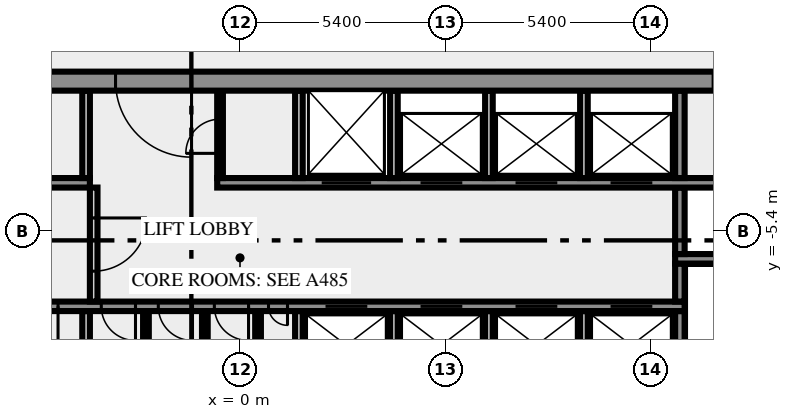
"""IFC4 building model, lengths in metres.
Left out: names, types, materials, properties, quantities, classifications, styles, units other than length and angle.
Written with IfcOpenShell. Run it as: python <this file> out.ifc"""

import sys

from ifc_helpers import new_model, si_unit, direction, frame, frame_2d, origin, place, context, subcontext, project, spatial, rectangle, extrude, element, fill, save


model = new_model("IFC4")
c1 = context("Model", 3, precision=1e-05, world=origin(), true_north=direction((0.0, 1.0)))
c2 = subcontext(c1, "Body", "Model", "MODEL_VIEW")
j1 = project(units=[si_unit("LENGTHUNIT", "METRE"), si_unit("PLANEANGLEUNIT", "RADIAN")], contexts=[c1])
p1 = place(None, origin())
s1 = spatial("IfcSite", under=j1, at=p1, CompositionType="ELEMENT")
p2 = place(p1, origin())
s2 = spatial("IfcBuilding", under=s1, at=p2, CompositionType="ELEMENT")
p3 = place(p2, frame((0.0, 0.0, 172.0)))
s3 = spatial("IfcBuildingStorey", under=s2, at=p3, CompositionType="ELEMENT", Elevation=172.0)
p4 = place(p3, frame((-4.05, -10.5, 0.0), z_axis=(0.0, 0.0, 1.0), x_axis=(0.0, 1.0, 0.0)))
e1 = element("IfcWall", 1, at=p4, inside=s3, PredefinedType="SOLIDWALL", context=c2, shape_type="SweptSolid", body=[
    extrude(rectangle(XDim=3.0, YDim=0.2, at=frame_2d((1.5, 0.0))), origin(), (0.0, 0.0, 1.0), 3.65),
])
for number, where, z_axis, x_axis in (
    (2, (-2.475, -10.5, 0.0), (0.0, 0.0, 1.0), (0.0, 1.0, 0.0)),
    (3, (-0.925, -10.5, 0.0), (0.0, 0.0, 1.0), (0.0, 1.0, 0.0)),
    (4, (0.475, -10.5, 0.0), (0.0, 0.0, 1.0), (0.0, 1.0, 0.0)),
):
    element("IfcWall", number, at=place(p3, frame(where, z_axis=z_axis, x_axis=x_axis)), inside=s3, PredefinedType="PARTITIONING", context=c2, shape_type="SweptSolid", body=[
        extrude(rectangle(XDim=3.0, YDim=0.15, at=frame_2d((1.5, 0.0))), origin(), (0.0, 0.0, 1.0), 3.65),
    ])
for number, where, z_axis, x_axis in (
    (5, (1.55, -10.5, 0.0), (0.0, 0.0, 1.0), (0.0, 1.0, 0.0)),
    (6, (4.05, -10.5, 0.0), (0.0, 0.0, 1.0), (0.0, 1.0, 0.0)),
    (7, (6.55, -10.5, 0.0), (0.0, 0.0, 1.0), (0.0, 1.0, 0.0)),
    (8, (9.05, -10.5, 0.0), (0.0, 0.0, 1.0), (0.0, 1.0, 0.0)),
):
    element("IfcWall", number, at=place(p3, frame(where, z_axis=z_axis, x_axis=x_axis)), inside=s3, PredefinedType="SOLIDWALL", context=c2, shape_type="SweptSolid", body=[
        extrude(rectangle(XDim=3.0, YDim=0.2, at=frame_2d((1.5, 0.0))), origin(), (0.0, 0.0, 1.0), 3.65),
    ])
p5 = place(p3, frame((11.575, -10.5, 0.0), z_axis=(0.0, 0.0, 1.0), x_axis=(0.0, 1.0, 0.0)))
e9 = element("IfcWall", 9, at=p5, inside=s3, PredefinedType="SHEAR", context=c2, shape_type="SweptSolid", body=[
    extrude(rectangle(XDim=3.0, YDim=0.25, at=frame_2d((1.5, 0.0))), origin(), (0.0, 0.0, 1.0), 3.65),
])
p6 = place(p3, frame((11.7, -7.375, 0.0), z_axis=(0.0, 0.0, 1.0), x_axis=(-1.0, 0.0, 0.0)))
e10 = element("IfcWall", 10, at=p6, inside=s3, PredefinedType="SHEAR", context=c2, shape_type="SweptSolid", body=[
    extrude(rectangle(XDim=23.4, YDim=0.25, at=frame_2d((11.7, 0.0))), origin(), (0.0, 0.0, 1.0), 3.65),
])
p7 = place(p6, frame((20.213, 0.0, 0.0)))
e11 = element("IfcOpeningElement", 11, at=p7, cuts=e10, PredefinedType="OPENING", context=c2, shape_type="SweptSolid", body=[
    extrude(rectangle(XDim=0.9, YDim=2.1, at=frame_2d((0.45, 1.05))), frame((0.0, 0.135, 0.0), z_axis=(0.0, -1.0, 0.0), x_axis=(1.0, 0.0, 0.0)), (0.0, 0.0, 1.0), 0.27),
])
p8 = place(p6, frame((16.488, 0.0, 0.0)))
e12 = element("IfcOpeningElement", 12, at=p8, cuts=e10, PredefinedType="OPENING", context=c2, shape_type="SweptSolid", body=[
    extrude(rectangle(XDim=0.9, YDim=2.1, at=frame_2d((0.45, 1.05))), frame((0.0, 0.135, 0.0), z_axis=(0.0, -1.0, 0.0), x_axis=(1.0, 0.0, 0.0)), (0.0, 0.0, 1.0), 0.27),
])
p9 = place(p6, frame((14.45, 0.0, 0.0)))
e13 = element("IfcOpeningElement", 13, at=p9, cuts=e10, PredefinedType="OPENING", context=c2, shape_type="SweptSolid", body=[
    extrude(rectangle(XDim=0.9, YDim=2.1, at=frame_2d((0.45, 1.05))), frame((0.0, 0.135, 0.0), z_axis=(0.0, -1.0, 0.0), x_axis=(1.0, 0.0, 0.0)), (0.0, 0.0, 1.0), 0.27),
])
p10 = place(p6, frame((12.95, 0.0, 0.0)))
e14 = element("IfcOpeningElement", 14, at=p10, cuts=e10, PredefinedType="OPENING", context=c2, shape_type="SweptSolid", body=[
    extrude(rectangle(XDim=0.9, YDim=2.1, at=frame_2d((0.45, 1.05))), frame((0.0, 0.135, 0.0), z_axis=(0.0, -1.0, 0.0), x_axis=(1.0, 0.0, 0.0)), (0.0, 0.0, 1.0), 0.27),
])
p11 = place(p6, frame((11.475, 0.0, 0.0)))
e15 = element("IfcOpeningElement", 15, at=p11, cuts=e10, PredefinedType="OPENING", context=c2, shape_type="SweptSolid", body=[
    extrude(rectangle(XDim=0.9, YDim=2.1, at=frame_2d((0.45, 1.05))), frame((0.0, 0.135, 0.0), z_axis=(0.0, -1.0, 0.0), x_axis=(1.0, 0.0, 0.0)), (0.0, 0.0, 1.0), 0.27),
])
p12 = place(p6, frame((10.45, 0.0, 0.0)))
e16 = element("IfcOpeningElement", 16, at=p12, cuts=e10, PredefinedType="OPENING", context=c2, shape_type="SweptSolid", body=[
    extrude(rectangle(XDim=0.5, YDim=2.1, at=frame_2d((0.25, 1.05))), frame((0.0, 0.135, 0.0), z_axis=(0.0, -1.0, 0.0), x_axis=(1.0, 0.0, 0.0)), (0.0, 0.0, 1.0), 0.27),
])
p13 = place(p6, frame((8.35, 0.0, 0.0)))
e17 = element("IfcOpeningElement", 17, at=p13, cuts=e10, PredefinedType="OPENING", context=c2, shape_type="SweptSolid", body=[
    extrude(rectangle(XDim=1.1, YDim=2.1, at=frame_2d((0.55, 1.05))), frame((0.0, 0.135, 0.0), z_axis=(0.0, -1.0, 0.0), x_axis=(1.0, 0.0, 0.0)), (0.0, 0.0, 1.0), 0.27),
])
p14 = place(p6, frame((5.85, 0.0, 0.0)))
e18 = element("IfcOpeningElement", 18, at=p14, cuts=e10, PredefinedType="OPENING", context=c2, shape_type="SweptSolid", body=[
    extrude(rectangle(XDim=1.1, YDim=2.1, at=frame_2d((0.55, 1.05))), frame((0.0, 0.135, 0.0), z_axis=(0.0, -1.0, 0.0), x_axis=(1.0, 0.0, 0.0)), (0.0, 0.0, 1.0), 0.27),
])
p15 = place(p6, frame((3.35, 0.0, 0.0)))
e19 = element("IfcOpeningElement", 19, at=p15, cuts=e10, PredefinedType="OPENING", context=c2, shape_type="SweptSolid", body=[
    extrude(rectangle(XDim=1.1, YDim=2.1, at=frame_2d((0.55, 1.05))), frame((0.0, 0.135, 0.0), z_axis=(0.0, -1.0, 0.0), x_axis=(1.0, 0.0, 0.0)), (0.0, 0.0, 1.0), 0.27),
])
p16 = place(p6, frame((0.85, 0.0, 0.0)))
e20 = element("IfcOpeningElement", 20, at=p16, cuts=e10, PredefinedType="OPENING", context=c2, shape_type="SweptSolid", body=[
    extrude(rectangle(XDim=1.1, YDim=2.1, at=frame_2d((0.55, 1.05))), frame((0.0, 0.135, 0.0), z_axis=(0.0, -1.0, 0.0), x_axis=(1.0, 0.0, 0.0)), (0.0, 0.0, 1.0), 0.27),
])
p17 = place(p3, frame((-3.85, -4.25, 0.0), z_axis=(0.0, 0.0, 1.0), x_axis=(0.0, -1.0, 0.0)))
e21 = element("IfcWall", 21, at=p17, inside=s3, PredefinedType="SOLIDWALL", context=c2, shape_type="SweptSolid", body=[
    extrude(rectangle(XDim=3.0, YDim=0.2, at=frame_2d((1.5, 0.0))), origin(), (0.0, 0.0, 1.0), 3.65),
])
p18 = place(p17, frame((0.8, 0.0, 0.0)))
e22 = element("IfcOpeningElement", 22, at=p18, cuts=e21, PredefinedType="OPENING", context=c2, shape_type="SweptSolid", body=[
    extrude(rectangle(XDim=1.4, YDim=2.1, at=frame_2d((0.7, 1.05))), frame((0.0, 0.11, 0.0), z_axis=(0.0, -1.0, 0.0), x_axis=(1.0, 0.0, 0.0)), (0.0, 0.0, 1.0), 0.22),
])
p19 = place(p3, frame((11.575, -7.25, 0.0), z_axis=(0.0, 0.0, 1.0), x_axis=(0.0, 1.0, 0.0)))
e23 = element("IfcWall", 23, at=p19, inside=s3, PredefinedType="SHEAR", context=c2, shape_type="SweptSolid", body=[
    extrude(rectangle(XDim=1.0, YDim=0.25, at=frame_2d((0.5, 0.0))), origin(), (0.0, 0.0, 1.0), 3.65),
])
p20 = place(p3, frame((19.5, -6.125, 0.0), z_axis=(0.0, 0.0, 1.0), x_axis=(-1.0, 0.0, 0.0)))
e24 = element("IfcWall", 24, at=p20, inside=s3, PredefinedType="SHEAR", context=c2, shape_type="SweptSolid", body=[
    extrude(rectangle(XDim=8.05, YDim=0.25, at=frame_2d((4.025, 0.0))), origin(), (0.0, 0.0, 1.0), 3.65),
])
p21 = place(p20, frame((0.05, 0.0, 0.0)))
e25 = element("IfcOpeningElement", 25, at=p21, cuts=e24, PredefinedType="OPENING", context=c2, shape_type="SweptSolid", body=[
    extrude(rectangle(XDim=1.8, YDim=2.1, at=frame_2d((0.9, 1.05))), frame((0.0, 0.135, 0.0), z_axis=(0.0, -1.0, 0.0), x_axis=(1.0, 0.0, 0.0)), (0.0, 0.0, 1.0), 0.27),
])
p22 = place(p3, frame((11.575, -6.0, 0.0), z_axis=(0.0, 0.0, 1.0), x_axis=(0.0, 1.0, 0.0)))
e26 = element("IfcWall", 26, at=p22, inside=s3, PredefinedType="SHEAR", context=c2, shape_type="SweptSolid", body=[
    extrude(rectangle(XDim=1.75, YDim=0.25, at=frame_2d((0.875, 0.0))), origin(), (0.0, 0.0, 1.0), 3.65),
])
p23 = place(p3, frame((-14.35, -4.125, 0.0), z_axis=(0.0, 0.0, 1.0), x_axis=(1.0, 0.0, 0.0)))
e27 = element("IfcWall", 27, at=p23, inside=s3, PredefinedType="SHEAR", context=c2, shape_type="SweptSolid", body=[
    extrude(rectangle(XDim=10.4, YDim=0.25, at=frame_2d((5.2, 0.0))), origin(), (0.0, 0.0, 1.0), 3.65),
])
p24 = place(p3, frame((-0.6, -4.125, 0.0), z_axis=(0.0, 0.0, 1.0), x_axis=(1.0, 0.0, 0.0)))
e28 = element("IfcWall", 28, at=p24, inside=s3, PredefinedType="SHEAR", context=c2, shape_type="SweptSolid", body=[
    extrude(rectangle(XDim=14.95, YDim=0.25, at=frame_2d((7.475, 0.0))), origin(), (0.0, 0.0, 1.0), 3.65),
])
p25 = place(p24, frame((2.75, 0.0, 0.0)))
e29 = element("IfcOpeningElement", 29, at=p25, cuts=e28, PredefinedType="OPENING", context=c2, shape_type="SweptSolid", body=[
    extrude(rectangle(XDim=1.3, YDim=2.1, at=frame_2d((0.65, 1.05))), frame((0.0, 0.135, 0.0), z_axis=(0.0, -1.0, 0.0), x_axis=(1.0, 0.0, 0.0)), (0.0, 0.0, 1.0), 0.27),
])
p26 = place(p24, frame((5.35, 0.0, 0.0)))
e30 = element("IfcOpeningElement", 30, at=p26, cuts=e28, PredefinedType="OPENING", context=c2, shape_type="SweptSolid", body=[
    extrude(rectangle(XDim=1.1, YDim=2.1, at=frame_2d((0.55, 1.05))), frame((0.0, 0.135, 0.0), z_axis=(0.0, -1.0, 0.0), x_axis=(1.0, 0.0, 0.0)), (0.0, 0.0, 1.0), 0.27),
])
p27 = place(p24, frame((7.85, 0.0, 0.0)))
e31 = element("IfcOpeningElement", 31, at=p27, cuts=e28, PredefinedType="OPENING", context=c2, shape_type="SweptSolid", body=[
    extrude(rectangle(XDim=1.1, YDim=2.1, at=frame_2d((0.55, 1.05))), frame((0.0, 0.135, 0.0), z_axis=(0.0, -1.0, 0.0), x_axis=(1.0, 0.0, 0.0)), (0.0, 0.0, 1.0), 0.27),
])
p28 = place(p24, frame((10.35, 0.0, 0.0)))
e32 = element("IfcOpeningElement", 32, at=p28, cuts=e28, PredefinedType="OPENING", context=c2, shape_type="SweptSolid", body=[
    extrude(rectangle(XDim=1.1, YDim=2.1, at=frame_2d((0.55, 1.05))), frame((0.0, 0.135, 0.0), z_axis=(0.0, -1.0, 0.0), x_axis=(1.0, 0.0, 0.0)), (0.0, 0.0, 1.0), 0.27),
])
p29 = place(p3, frame((-4.05, -4.0, 0.0), z_axis=(0.0, 0.0, 1.0), x_axis=(0.0, 1.0, 0.0)))
e33 = element("IfcWall", 33, at=p29, inside=s3, PredefinedType="SOLIDWALL", context=c2, shape_type="SweptSolid", body=[
    extrude(rectangle(XDim=2.3, YDim=0.2, at=frame_2d((1.15, 0.0))), origin(), (0.0, 0.0, 1.0), 3.65),
])
p30 = place(p3, frame((-0.525, -4.0, 0.0), z_axis=(0.0, 0.0, 1.0), x_axis=(0.0, 1.0, 0.0)))
e34 = element("IfcWall", 34, at=p30, inside=s3, PredefinedType="PARTITIONING", context=c2, shape_type="SweptSolid", body=[
    extrude(rectangle(XDim=2.3, YDim=0.15, at=frame_2d((1.15, 0.0))), origin(), (0.0, 0.0, 1.0), 3.65),
])
p31 = place(p30, frame((0.65, 0.0, 0.0)))
e35 = element("IfcOpeningElement", 35, at=p31, cuts=e34, PredefinedType="OPENING", context=c2, shape_type="SweptSolid", body=[
    extrude(rectangle(XDim=0.9, YDim=2.1, at=frame_2d((0.45, 1.05))), frame((0.0, 0.085, 0.0), z_axis=(0.0, -1.0, 0.0), x_axis=(1.0, 0.0, 0.0)), (0.0, 0.0, 1.0), 0.17),
])
for number, where, z_axis, x_axis in (
    (36, (1.55, -4.0, 0.0), (0.0, 0.0, 1.0), (0.0, 1.0, 0.0)),
    (37, (4.05, -4.0, 0.0), (0.0, 0.0, 1.0), (0.0, 1.0, 0.0)),
    (38, (6.55, -4.0, 0.0), (0.0, 0.0, 1.0), (0.0, 1.0, 0.0)),
    (39, (9.05, -4.0, 0.0), (0.0, 0.0, 1.0), (0.0, 1.0, 0.0)),
):
    element("IfcWall", number, at=place(p3, frame(where, z_axis=z_axis, x_axis=x_axis)), inside=s3, PredefinedType="SOLIDWALL", context=c2, shape_type="SweptSolid", body=[
        extrude(rectangle(XDim=2.3, YDim=0.2, at=frame_2d((1.15, 0.0))), origin(), (0.0, 0.0, 1.0), 3.65),
    ])
p32 = place(p3, frame((11.575, -4.0, 0.0), z_axis=(0.0, 0.0, 1.0), x_axis=(0.0, 1.0, 0.0)))
e40 = element("IfcWall", 40, at=p32, inside=s3, PredefinedType="SHEAR", context=c2, shape_type="SweptSolid", body=[
    extrude(rectangle(XDim=2.3, YDim=0.25, at=frame_2d((1.15, 0.0))), origin(), (0.0, 0.0, 1.0), 3.65),
])
p33 = place(p3, frame((20.49, -1.45, 0.0), z_axis=(0.0, 0.0, 1.0), x_axis=(-1.0, 0.0, 0.0)))
e41 = element("IfcWall", 41, at=p33, inside=s3, PredefinedType="SHEAR", context=c2, shape_type="SweptSolid", body=[
    extrude(rectangle(XDim=40.98, YDim=0.5, at=frame_2d((20.49, 0.0))), origin(), (0.0, 0.0, 1.0), 3.65),
])
p34 = place(p33, frame((38.14, 0.0, 0.0)))
e42 = element("IfcOpeningElement", 42, at=p34, cuts=e41, PredefinedType="OPENING", context=c2, shape_type="SweptSolid", body=[
    extrude(rectangle(XDim=1.8, YDim=2.1, at=frame_2d((0.9, 1.05))), frame((0.0, 0.26, 0.0), z_axis=(0.0, -1.0, 0.0), x_axis=(1.0, 0.0, 0.0)), (0.0, 0.0, 1.0), 0.52),
])
p35 = place(p33, frame((36.728, 0.0, 0.0)))
e43 = element("IfcOpeningElement", 43, at=p35, cuts=e41, PredefinedType="OPENING", context=c2, shape_type="SweptSolid", body=[
    extrude(rectangle(XDim=0.8, YDim=2.1, at=frame_2d((0.4, 1.05))), frame((0.0, 0.26, 0.0), z_axis=(0.0, -1.0, 0.0), x_axis=(1.0, 0.0, 0.0)), (0.0, 0.0, 1.0), 0.52),
])
p36 = place(p33, frame((35.153, 0.0, 0.0)))
e44 = element("IfcOpeningElement", 44, at=p36, cuts=e41, PredefinedType="OPENING", context=c2, shape_type="SweptSolid", body=[
    extrude(rectangle(XDim=0.8, YDim=2.1, at=frame_2d((0.4, 1.05))), frame((0.0, 0.26, 0.0), z_axis=(0.0, -1.0, 0.0), x_axis=(1.0, 0.0, 0.0)), (0.0, 0.0, 1.0), 0.52),
])
p37 = place(p33, frame((32.94, 0.0, 0.0)))
e45 = element("IfcOpeningElement", 45, at=p37, cuts=e41, PredefinedType="OPENING", context=c2, shape_type="SweptSolid", body=[
    extrude(rectangle(XDim=0.9, YDim=2.1, at=frame_2d((0.45, 1.05))), frame((0.0, 0.26, 0.0), z_axis=(0.0, -1.0, 0.0), x_axis=(1.0, 0.0, 0.0)), (0.0, 0.0, 1.0), 0.52),
])
p38 = place(p33, frame((27.84, 0.0, 0.0)))
e46 = element("IfcOpeningElement", 46, at=p38, cuts=e41, PredefinedType="OPENING", context=c2, shape_type="SweptSolid", body=[
    extrude(rectangle(XDim=0.9, YDim=2.1, at=frame_2d((0.45, 1.05))), frame((0.0, 0.26, 0.0), z_axis=(0.0, -1.0, 0.0), x_axis=(1.0, 0.0, 0.0)), (0.0, 0.0, 1.0), 0.52),
])
p39 = place(p33, frame((21.765, 0.0, 0.0)))
e47 = element("IfcOpeningElement", 47, at=p39, cuts=e41, PredefinedType="OPENING", context=c2, shape_type="SweptSolid", body=[
    extrude(rectangle(XDim=2.0, YDim=2.1, at=frame_2d((1.0, 1.05))), frame((0.0, 0.26, 0.0), z_axis=(0.0, -1.0, 0.0), x_axis=(1.0, 0.0, 0.0)), (0.0, 0.0, 1.0), 0.52),
])
p40 = place(p33, frame((7.14, 0.0, 0.0)))
e48 = element("IfcOpeningElement", 48, at=p40, cuts=e41, PredefinedType="OPENING", context=c2, shape_type="SweptSolid", body=[
    extrude(rectangle(XDim=0.9, YDim=2.1, at=frame_2d((0.45, 1.05))), frame((0.0, 0.26, 0.0), z_axis=(0.0, -1.0, 0.0), x_axis=(1.0, 0.0, 0.0)), (0.0, 0.0, 1.0), 0.52),
])
p41 = place(p33, frame((4.19, 0.0, 0.0)))
e49 = element("IfcOpeningElement", 49, at=p41, cuts=e41, PredefinedType="OPENING", context=c2, shape_type="SweptSolid", body=[
    extrude(rectangle(XDim=0.9, YDim=2.1, at=frame_2d((0.45, 1.05))), frame((0.0, 0.26, 0.0), z_axis=(0.0, -1.0, 0.0), x_axis=(1.0, 0.0, 0.0)), (0.0, 0.0, 1.0), 0.52),
])
p42 = place(p33, frame((1.04, 0.0, 0.0)))
e50 = element("IfcOpeningElement", 50, at=p42, cuts=e41, PredefinedType="OPENING", context=c2, shape_type="SweptSolid", body=[
    extrude(rectangle(XDim=1.8, YDim=2.1, at=frame_2d((0.9, 1.05))), frame((0.0, 0.26, 0.0), z_axis=(0.0, -1.0, 0.0), x_axis=(1.0, 0.0, 0.0)), (0.0, 0.0, 1.0), 0.52),
])
p43 = place(p8, origin())
e51 = element("IfcDoor", 51, at=p43, inside=s3, OperationType="SINGLE_SWING_RIGHT", PredefinedType="DOOR", context=c2, shape_type="SweptSolid", body=[
    extrude(rectangle(XDim=0.9, YDim=2.1, at=frame_2d((0.45, 1.05))), frame((0.0, 0.025, 0.0), z_axis=(0.0, -1.0, 0.0), x_axis=(1.0, 0.0, 0.0)), (0.0, 0.0, 1.0), 0.05),
])
fill(e12, e51)
p44 = place(p9, origin())
e52 = element("IfcDoor", 52, at=p44, inside=s3, OperationType="SINGLE_SWING_RIGHT", PredefinedType="DOOR", context=c2, shape_type="SweptSolid", body=[
    extrude(rectangle(XDim=0.9, YDim=2.1, at=frame_2d((0.45, 1.05))), frame((0.0, 0.025, 0.0), z_axis=(0.0, -1.0, 0.0), x_axis=(1.0, 0.0, 0.0)), (0.0, 0.0, 1.0), 0.05),
])
fill(e13, e52)
p45 = place(p10, origin())
e53 = element("IfcDoor", 53, at=p45, inside=s3, OperationType="SINGLE_SWING_RIGHT", PredefinedType="DOOR", context=c2, shape_type="SweptSolid", body=[
    extrude(rectangle(XDim=0.9, YDim=2.1, at=frame_2d((0.45, 1.05))), frame((0.0, 0.025, 0.0), z_axis=(0.0, -1.0, 0.0), x_axis=(1.0, 0.0, 0.0)), (0.0, 0.0, 1.0), 0.05),
])
fill(e14, e53)
p46 = place(p11, origin())
e54 = element("IfcDoor", 54, at=p46, inside=s3, OperationType="SINGLE_SWING_RIGHT", PredefinedType="DOOR", context=c2, shape_type="SweptSolid", body=[
    extrude(rectangle(XDim=0.9, YDim=2.1, at=frame_2d((0.45, 1.05))), frame((0.0, 0.025, 0.0), z_axis=(0.0, -1.0, 0.0), x_axis=(1.0, 0.0, 0.0)), (0.0, 0.0, 1.0), 0.05),
])
fill(e15, e54)
p47 = place(p12, origin())
e55 = element("IfcDoor", 55, at=p47, inside=s3, OperationType="SINGLE_SWING_LEFT", PredefinedType="DOOR", context=c2, shape_type="SweptSolid", body=[
    extrude(rectangle(XDim=0.5, YDim=2.1, at=frame_2d((0.25, 1.05))), frame((0.0, 0.025, 0.0), z_axis=(0.0, -1.0, 0.0), x_axis=(1.0, 0.0, 0.0)), (0.0, 0.0, 1.0), 0.05),
])
fill(e16, e55)
p48 = place(p13, origin())
e56 = element("IfcDoor", 56, at=p48, inside=s3, OperationType="DOUBLE_DOOR_SLIDING", PredefinedType="DOOR", context=c2, shape_type="SweptSolid", body=[
    extrude(rectangle(XDim=1.1, YDim=2.1, at=frame_2d((0.55, 1.05))), frame((0.0, 0.025, 0.0), z_axis=(0.0, -1.0, 0.0), x_axis=(1.0, 0.0, 0.0)), (0.0, 0.0, 1.0), 0.05),
])
fill(e17, e56)
p49 = place(p14, origin())
e57 = element("IfcDoor", 57, at=p49, inside=s3, OperationType="DOUBLE_DOOR_SLIDING", PredefinedType="DOOR", context=c2, shape_type="SweptSolid", body=[
    extrude(rectangle(XDim=1.1, YDim=2.1, at=frame_2d((0.55, 1.05))), frame((0.0, 0.025, 0.0), z_axis=(0.0, -1.0, 0.0), x_axis=(1.0, 0.0, 0.0)), (0.0, 0.0, 1.0), 0.05),
])
fill(e18, e57)
p50 = place(p15, origin())
e58 = element("IfcDoor", 58, at=p50, inside=s3, OperationType="DOUBLE_DOOR_SLIDING", PredefinedType="DOOR", context=c2, shape_type="SweptSolid", body=[
    extrude(rectangle(XDim=1.1, YDim=2.1, at=frame_2d((0.55, 1.05))), frame((0.0, 0.025, 0.0), z_axis=(0.0, -1.0, 0.0), x_axis=(1.0, 0.0, 0.0)), (0.0, 0.0, 1.0), 0.05),
])
fill(e19, e58)
p51 = place(p16, origin())
e59 = element("IfcDoor", 59, at=p51, inside=s3, OperationType="DOUBLE_DOOR_SLIDING", PredefinedType="DOOR", context=c2, shape_type="SweptSolid", body=[
    extrude(rectangle(XDim=1.1, YDim=2.1, at=frame_2d((0.55, 1.05))), frame((0.0, 0.025, 0.0), z_axis=(0.0, -1.0, 0.0), x_axis=(1.0, 0.0, 0.0)), (0.0, 0.0, 1.0), 0.05),
])
fill(e20, e59)
p52 = place(p18, origin())
e60 = element("IfcDoor", 60, at=p52, inside=s3, OperationType="DOUBLE_DOOR_SINGLE_SWING", PredefinedType="DOOR", context=c2, shape_type="SweptSolid", body=[
    extrude(rectangle(XDim=1.4, YDim=2.1, at=frame_2d((0.7, 1.05))), frame((0.0, 0.025, 0.0), z_axis=(0.0, -1.0, 0.0), x_axis=(1.0, 0.0, 0.0)), (0.0, 0.0, 1.0), 0.05),
])
fill(e22, e60)
p53 = place(p25, origin())
e61 = element("IfcDoor", 61, at=p53, inside=s3, OperationType="DOUBLE_DOOR_SLIDING", PredefinedType="DOOR", context=c2, shape_type="SweptSolid", body=[
    extrude(rectangle(XDim=1.3, YDim=2.1, at=frame_2d((0.65, 1.05))), frame((0.0, 0.025, 0.0), z_axis=(0.0, -1.0, 0.0), x_axis=(1.0, 0.0, 0.0)), (0.0, 0.0, 1.0), 0.05),
])
fill(e29, e61)
p54 = place(p26, origin())
e62 = element("IfcDoor", 62, at=p54, inside=s3, OperationType="DOUBLE_DOOR_SLIDING", PredefinedType="DOOR", context=c2, shape_type="SweptSolid", body=[
    extrude(rectangle(XDim=1.1, YDim=2.1, at=frame_2d((0.55, 1.05))), frame((0.0, 0.025, 0.0), z_axis=(0.0, -1.0, 0.0), x_axis=(1.0, 0.0, 0.0)), (0.0, 0.0, 1.0), 0.05),
])
fill(e30, e62)
p55 = place(p27, origin())
e63 = element("IfcDoor", 63, at=p55, inside=s3, OperationType="DOUBLE_DOOR_SLIDING", PredefinedType="DOOR", context=c2, shape_type="SweptSolid", body=[
    extrude(rectangle(XDim=1.1, YDim=2.1, at=frame_2d((0.55, 1.05))), frame((0.0, 0.025, 0.0), z_axis=(0.0, -1.0, 0.0), x_axis=(1.0, 0.0, 0.0)), (0.0, 0.0, 1.0), 0.05),
])
fill(e31, e63)
p56 = place(p28, origin())
e64 = element("IfcDoor", 64, at=p56, inside=s3, OperationType="DOUBLE_DOOR_SLIDING", PredefinedType="DOOR", context=c2, shape_type="SweptSolid", body=[
    extrude(rectangle(XDim=1.1, YDim=2.1, at=frame_2d((0.55, 1.05))), frame((0.0, 0.025, 0.0), z_axis=(0.0, -1.0, 0.0), x_axis=(1.0, 0.0, 0.0)), (0.0, 0.0, 1.0), 0.05),
])
fill(e32, e64)
p57 = place(p31, origin())
e65 = element("IfcDoor", 65, at=p57, inside=s3, OperationType="SINGLE_SWING_LEFT", PredefinedType="DOOR", context=c2, shape_type="SweptSolid", body=[
    extrude(rectangle(XDim=0.9, YDim=2.1, at=frame_2d((0.45, 1.05))), frame((0.0, 0.025, 0.0), z_axis=(0.0, -1.0, 0.0), x_axis=(1.0, 0.0, 0.0)), (0.0, 0.0, 1.0), 0.05),
])
fill(e35, e65)
p58 = place(p39, origin())
e66 = element("IfcDoor", 66, at=p58, inside=s3, OperationType="DOUBLE_DOOR_SINGLE_SWING", PredefinedType="DOOR", context=c2, shape_type="SweptSolid", body=[
    extrude(rectangle(XDim=2.0, YDim=2.1, at=frame_2d((1.0, 1.05))), frame((0.0, 0.025, 0.0), z_axis=(0.0, -1.0, 0.0), x_axis=(1.0, 0.0, 0.0)), (0.0, 0.0, 1.0), 0.05),
])
fill(e47, e66)
save(model, sys.argv[1])
